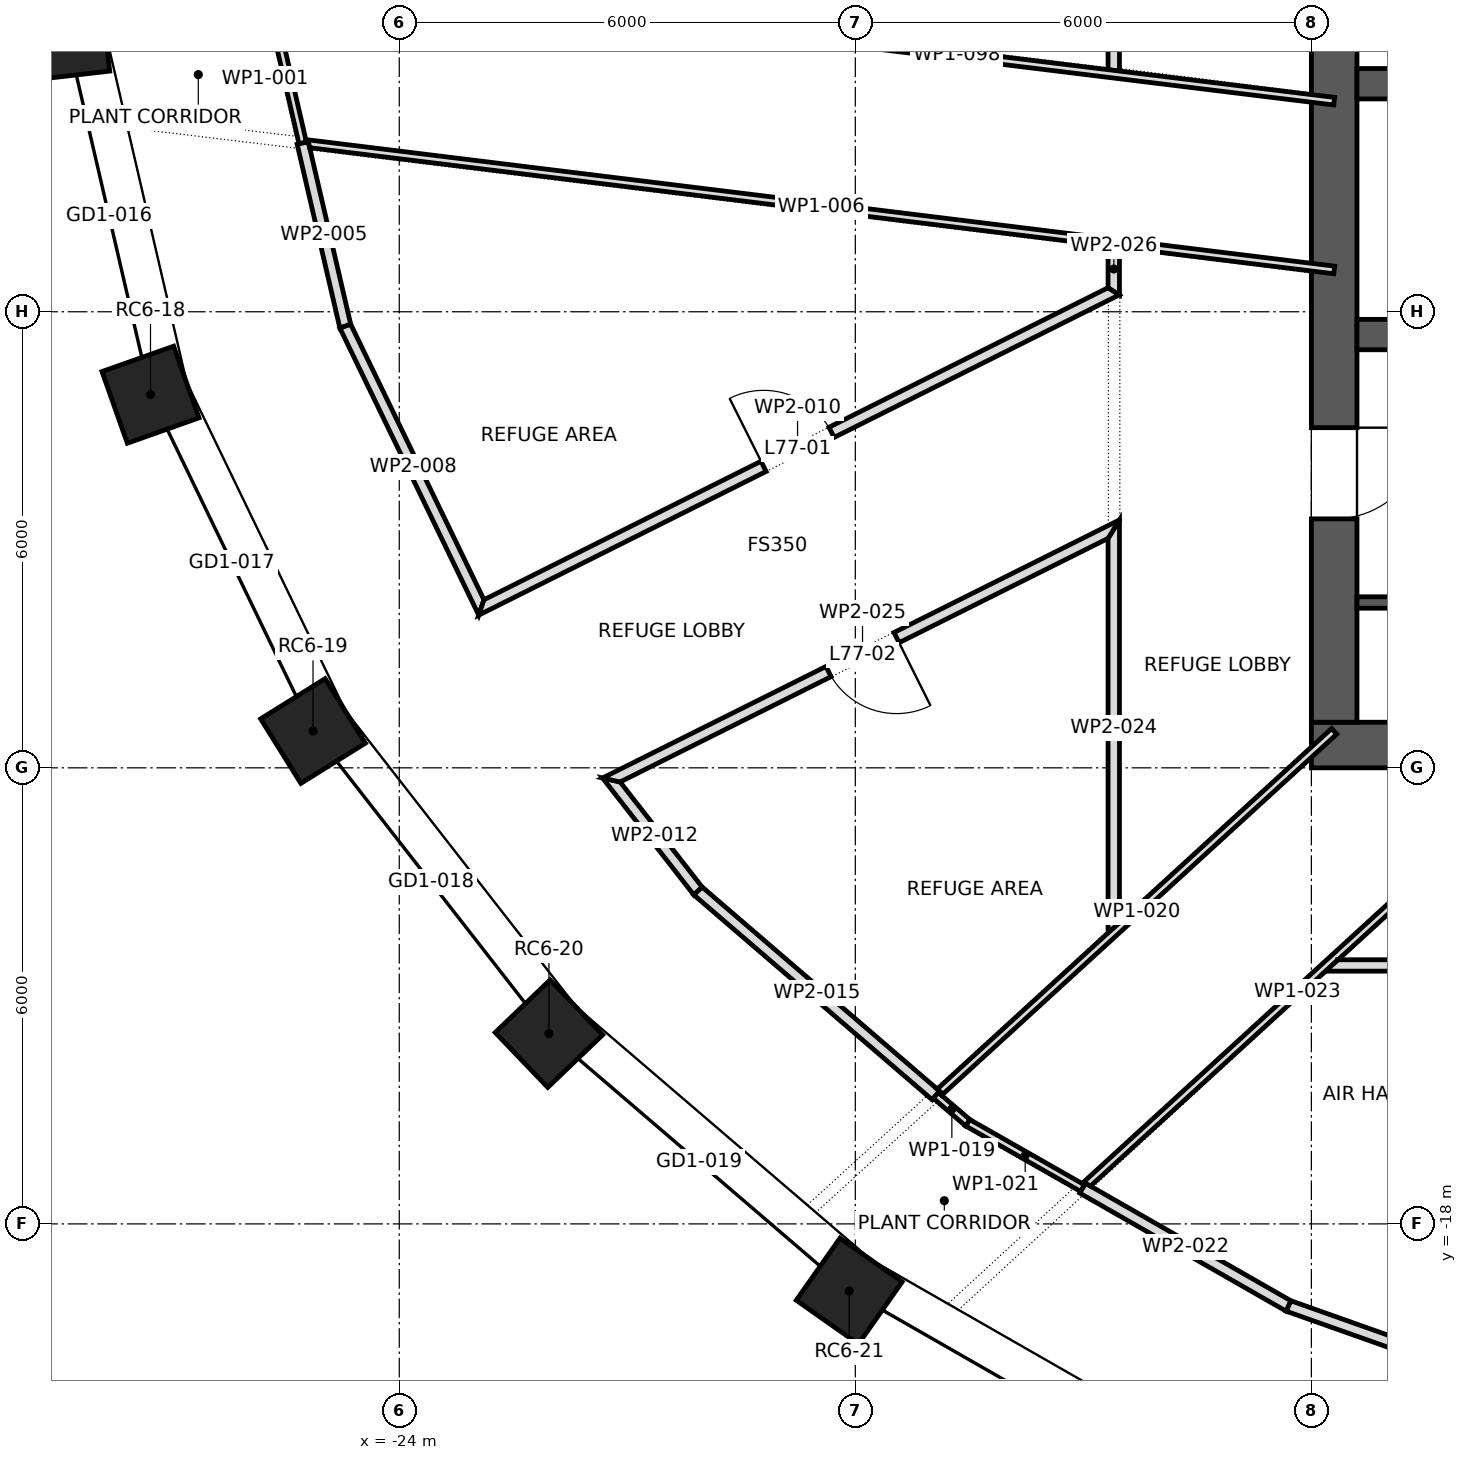
"""IFC4 building model, lengths in metres.
Left out: names, types, materials, properties, quantities, classifications, styles, units other than length and angle.
Written with IfcOpenShell. Run it as: python <this file> out.ifc"""

import sys

from ifc_helpers import new_model, si_unit, direction, frame, frame_2d, origin, origin_2d, place, context, subcontext, project, spatial, polyline, rectangle, outline, extrude, element, fill, save


model = new_model("IFC4")
c1 = context("Model", 3, precision=1e-05, world=origin(), true_north=direction((0.0, 1.0)))
c2 = subcontext(c1, "Body", "Model", "MODEL_VIEW")
j1 = project(units=[si_unit("LENGTHUNIT", "METRE"), si_unit("PLANEANGLEUNIT", "RADIAN")], contexts=[c1])
p1 = place(None, origin())
s1 = spatial("IfcSite", under=j1, at=p1, CompositionType="ELEMENT")
p2 = place(p1, origin())
s2 = spatial("IfcBuilding", under=s1, at=p2, CompositionType="ELEMENT")
p3 = place(p2, frame((0.0, 0.0, 328.3)))
s3 = spatial("IfcBuildingStorey", under=s2, at=p3, CompositionType="ELEMENT", Elevation=328.3)
for number, where, z_axis, x_axis in (
    (1, (-28.363, -2.394, 0.0), (0.0, 0.0, 1.0), (0.114, -0.993, 0.0)),
    (2, (-27.273, -7.091, 0.0), (0.0, 0.0, 1.0), (0.334, -0.943, 0.0)),
    (3, (-25.135, -11.516, 0.0), (0.0, 0.0, 1.0), (0.529, -0.849, 0.0)),
    (4, (-22.031, -15.497, 0.0), (0.0, 0.0, 1.0), (0.692, -0.722, 0.0)),
    (5, (-18.08, -18.884, 0.0), (0.0, 0.0, 1.0), (0.818, -0.575, 0.0)),
):
    element("IfcColumn", number, at=place(p3, frame(where, z_axis=z_axis, x_axis=x_axis)), inside=s3, PredefinedType="COLUMN", context=c2, shape_type="SweptSolid", body=[
        extrude(rectangle(XDim=1.0, YDim=1.0, at=origin_2d()), origin(), (0.0, 0.0, 1.0), 5.0),
    ])
p4 = place(p3, frame((-12.0, -11.7, 0.0), z_axis=(0.0, 0.0, 1.0), x_axis=(1.0, 0.0, 0.0)))
e6 = element("IfcWall", 6, at=p4, inside=s3, PredefinedType="SHEAR", context=c2, shape_type="SweptSolid", body=[
    extrude(rectangle(XDim=24.0, YDim=0.6, at=frame_2d((12.0, 0.0))), origin(), (0.0, 0.0, 1.0), 5.0),
])
p5 = place(p4, frame((10.025, 0.0, 0.0)))
e7 = element("IfcOpeningElement", 7, at=p5, cuts=e6, PredefinedType="OPENING", context=c2, shape_type="SweptSolid", body=[
    extrude(rectangle(XDim=0.8, YDim=2.1, at=frame_2d((0.4, 1.05))), frame((0.0, 0.312, 0.0), z_axis=(0.0, -1.0, 0.0), x_axis=(1.0, 0.0, 0.0)), (0.0, 0.0, 1.0), 0.624),
])
p6 = place(p4, frame((4.2, 0.0, 0.0)))
e8 = element("IfcOpeningElement", 8, at=p6, cuts=e6, PredefinedType="OPENING", context=c2, shape_type="SweptSolid", body=[
    extrude(rectangle(XDim=0.8, YDim=2.1, at=frame_2d((0.4, 1.05))), frame((0.0, 0.312, 0.0), z_axis=(0.0, -1.0, 0.0), x_axis=(1.0, 0.0, 0.0)), (0.0, 0.0, 1.0), 0.624),
])
p7 = place(p4, frame((15.85, 0.0, 0.0)))
e9 = element("IfcOpeningElement", 9, at=p7, cuts=e6, PredefinedType="OPENING", context=c2, shape_type="SweptSolid", body=[
    extrude(rectangle(XDim=0.8, YDim=2.1, at=frame_2d((0.4, 1.05))), frame((0.0, 0.312, 0.0), z_axis=(0.0, -1.0, 0.0), x_axis=(1.0, 0.0, 0.0)), (0.0, 0.0, 1.0), 0.624),
])
p8 = place(p3, frame((-11.7, -11.4, 0.0), z_axis=(0.0, 0.0, 1.0), x_axis=(0.0, 1.0, 0.0)))
e10 = element("IfcWall", 10, at=p8, inside=s3, PredefinedType="SHEAR", context=c2, shape_type="SweptSolid", body=[
    extrude(rectangle(XDim=22.8, YDim=0.6, at=frame_2d((11.4, 0.0))), origin(), (0.0, 0.0, 1.0), 5.0),
])
p9 = place(p8, frame((10.2, 0.0, 0.0)))
e11 = element("IfcOpeningElement", 11, at=p9, cuts=e10, PredefinedType="OPENING", context=c2, shape_type="SweptSolid", body=[
    extrude(rectangle(XDim=2.4, YDim=2.1, at=frame_2d((1.2, 1.05))), frame((0.0, 0.312, 0.0), z_axis=(0.0, -1.0, 0.0), x_axis=(1.0, 0.0, 0.0)), (0.0, 0.0, 1.0), 0.624),
])
p10 = place(p8, frame((18.925, 0.0, 0.0)))
e12 = element("IfcOpeningElement", 12, at=p10, cuts=e10, PredefinedType="OPENING", context=c2, shape_type="SweptSolid", body=[
    extrude(rectangle(XDim=1.2, YDim=2.1, at=frame_2d((0.6, 1.05))), frame((0.0, 0.312, 0.0), z_axis=(0.0, -1.0, 0.0), x_axis=(1.0, 0.0, 0.0)), (0.0, 0.0, 1.0), 0.624),
])
p11 = place(p8, frame((2.675, 0.0, 0.0)))
e13 = element("IfcOpeningElement", 13, at=p11, cuts=e10, PredefinedType="OPENING", context=c2, shape_type="SweptSolid", body=[
    extrude(rectangle(XDim=1.2, YDim=2.1, at=frame_2d((0.6, 1.05))), frame((0.0, 0.312, 0.0), z_axis=(0.0, -1.0, 0.0), x_axis=(1.0, 0.0, 0.0)), (0.0, 0.0, 1.0), 0.624),
])
p12 = place(p3, frame((-11.4, -3.0, 0.0), z_axis=(0.0, 0.0, 1.0), x_axis=(1.0, 0.0, 0.0)))
e14 = element("IfcWall", 14, at=p12, inside=s3, PredefinedType="SHEAR", context=c2, shape_type="SweptSolid", body=[
    extrude(rectangle(XDim=22.8, YDim=0.4, at=frame_2d((11.4, 0.0))), origin(), (0.0, 0.0, 1.0), 5.0),
])
p13 = place(p12, frame((18.35, 0.0, 0.0)))
e15 = element("IfcOpeningElement", 15, at=p13, cuts=e14, PredefinedType="OPENING", context=c2, shape_type="SweptSolid", body=[
    extrude(rectangle(XDim=1.1, YDim=2.1, at=frame_2d((0.55, 1.05))), frame((0.0, 0.212, 0.0), z_axis=(0.0, -1.0, 0.0), x_axis=(1.0, 0.0, 0.0)), (0.0, 0.0, 1.0), 0.424),
])
p14 = place(p12, frame((13.137, 0.0, 0.0)))
e16 = element("IfcOpeningElement", 16, at=p14, cuts=e14, PredefinedType="OPENING", context=c2, shape_type="SweptSolid", body=[
    extrude(rectangle(XDim=0.8, YDim=2.1, at=frame_2d((0.4, 1.05))), frame((0.0, 0.212, 0.0), z_axis=(0.0, -1.0, 0.0), x_axis=(1.0, 0.0, 0.0)), (0.0, 0.0, 1.0), 0.424),
])
p15 = place(p12, frame((15.512, 0.0, 0.0)))
e17 = element("IfcOpeningElement", 17, at=p15, cuts=e14, PredefinedType="OPENING", context=c2, shape_type="SweptSolid", body=[
    extrude(rectangle(XDim=0.9, YDim=2.1, at=frame_2d((0.45, 1.05))), frame((0.0, 0.212, 0.0), z_axis=(0.0, -1.0, 0.0), x_axis=(1.0, 0.0, 0.0)), (0.0, 0.0, 1.0), 0.424),
])
p16 = place(p12, frame((5.95, 0.0, 0.0)))
e18 = element("IfcOpeningElement", 18, at=p16, cuts=e14, PredefinedType="OPENING", context=c2, shape_type="SweptSolid", body=[
    extrude(rectangle(XDim=0.9, YDim=2.1, at=frame_2d((0.45, 1.05))), frame((0.0, 0.212, 0.0), z_axis=(0.0, -1.0, 0.0), x_axis=(1.0, 0.0, 0.0)), (0.0, 0.0, 1.0), 0.424),
])
p17 = place(p3, frame((-11.4, -6.3, 0.0), z_axis=(0.0, 0.0, 1.0), x_axis=(1.0, 0.0, 0.0)))
e19 = element("IfcWall", 19, at=p17, inside=s3, PredefinedType="SHEAR", context=c2, shape_type="SweptSolid", body=[
    extrude(rectangle(XDim=22.8, YDim=0.4, at=frame_2d((11.4, 0.0))), origin(), (0.0, 0.0, 1.0), 5.0),
])
p18 = place(p17, frame((20.85, 0.0, 0.0)))
e20 = element("IfcOpeningElement", 20, at=p18, cuts=e19, PredefinedType="OPENING", context=c2, shape_type="SweptSolid", body=[
    extrude(rectangle(XDim=1.1, YDim=2.1, at=frame_2d((0.55, 1.05))), frame((0.0, 0.212, 0.0), z_axis=(0.0, -1.0, 0.0), x_axis=(1.0, 0.0, 0.0)), (0.0, 0.0, 1.0), 0.424),
])
p19 = place(p3, frame((-11.4, -9.825, 0.0), z_axis=(0.0, 0.0, 1.0), x_axis=(1.0, 0.0, 0.0)))
e21 = element("IfcWall", 21, at=p19, inside=s3, PredefinedType="SHEAR", context=c2, shape_type="SweptSolid", body=[
    extrude(rectangle(XDim=8.0, YDim=0.15, at=frame_2d((4.0, 0.0))), origin(), (0.0, 0.0, 1.0), 4.65),
])
p20 = place(p3, frame((-25.661, -2.084, 0.0), z_axis=(0.0, 0.0, 1.0), x_axis=(0.224900492943, -0.974381736423, 0.0)))
e22 = element("IfcWall", 22, at=p20, inside=s3, PredefinedType="PARTITIONING", context=c2, shape_type="SweptSolid", body=[
    extrude(outline(polyline([(1.74, 0.05), (0.011, 0.05), (0.0, -0.05), (0.0, -0.05), (1.74, -0.05), (1.74, 0.05)])), origin(), (0.0, 0.0, 1.0), 4.65),
])
p21 = place(p3, frame((-25.27, -3.78, 0.0), z_axis=(0.0, 0.0, 1.0), x_axis=(0.226374638152, -0.974040308818, 0.0)))
e23 = element("IfcWall", 23, at=p21, inside=s3, PredefinedType="PARTITIONING", context=c2, shape_type="SweptSolid", body=[
    extrude(outline(polyline([(0.0, -0.075), (2.482, -0.075), (2.466, 0.075), (0.0, 0.075), (0.0, -0.075)])), origin(), (0.0, 0.0, 1.0), 4.65),
])
p22 = place(p3, frame((-25.235, -3.784, 0.0), z_axis=(0.0, 0.0, 1.0), x_axis=(0.992511578582, -0.122150588948, 0.0)))
e24 = element("IfcWall", 24, at=p22, inside=s3, PredefinedType="PARTITIONING", context=c2, shape_type="SweptSolid", body=[
    extrude(outline(polyline([(0.063, -0.05), (1.852, -0.05), (3.64, -0.05), (5.429, -0.05), (7.218, -0.05), (9.007, -0.05), (10.795, -0.05), (10.797, -0.05), (10.797, -0.05), (12.217, -0.05), (13.637, -0.05), (13.637, 0.05), (11.689, 0.05), (9.741, 0.05), (7.792, 0.05), (5.844, 0.05), (3.896, 0.05), (1.948, 0.05), (0.0, 0.05), (0.0, 0.049), (0.011, 0.017), (0.035, 0.026), (0.063, -0.05)])), origin(), (0.0, 0.0, 1.0), 4.65),
])
p23 = place(p3, frame((-24.714, -6.183, 0.0), z_axis=(0.0, 0.0, 1.0), x_axis=(0.435487900819, -0.900194583543, 0.0)))
e25 = element("IfcWall", 25, at=p23, inside=s3, PredefinedType="PARTITIONING", context=c2, shape_type="SweptSolid", body=[
    extrude(outline(polyline([(0.0, -0.075), (1.398, -0.075), (2.796, -0.075), (4.195, -0.075), (4.043, 0.075), (2.701, 0.075), (1.359, 0.075), (0.017, 0.075), (0.0, -0.074), (0.0, -0.075)])), origin(), (0.0, 0.0, 1.0), 4.65),
])
p24 = place(p3, frame((-22.988, -9.924, 0.0), z_axis=(0.0, 0.0, 1.0), x_axis=(0.894422009939, 0.447223957471, 0.0)))
e26 = element("IfcWall", 26, at=p24, inside=s3, PredefinedType="PARTITIONING", context=c2, shape_type="SweptSolid", body=[
    extrude(outline(polyline([(0.0, -0.075), (1.885, -0.075), (3.77, -0.075), (5.655, -0.075), (7.54, -0.075), (9.424, -0.075), (9.332, 0.075), (7.496, 0.075), (5.66, 0.075), (3.824, 0.075), (1.988, 0.075), (0.152, 0.075), (0.0, -0.075)])), origin(), (0.0, 0.0, 1.0), 4.65),
])
p25 = place(p24, frame((4.227, 0.0, 0.0)))
e27 = element("IfcOpeningElement", 27, at=p25, cuts=e26, PredefinedType="OPENING", context=c2, shape_type="SweptSolid", body=[
    extrude(rectangle(XDim=1.0, YDim=2.1, at=frame_2d((0.5, 1.05))), frame((0.0, 0.087, 0.0), z_axis=(0.0, -1.0, 0.0), x_axis=(1.0, 0.0, 0.0)), (0.0, 0.0, 1.0), 0.174),
])
p26 = place(p3, frame((-21.266, -12.088, 0.0), z_axis=(0.0, 0.0, 1.0), x_axis=(0.615359969765, -0.788246222706, 0.0)))
e28 = element("IfcWall", 28, at=p26, inside=s3, PredefinedType="PARTITIONING", context=c2, shape_type="SweptSolid", body=[
    extrude(outline(polyline([(0.0, -0.075), (1.951, -0.075), (1.937, 0.075), (0.184, 0.075), (0.0, -0.075)])), origin(), (0.0, 0.0, 1.0), 4.65),
])
p27 = place(p3, frame((-20.076, -13.615, 0.0), z_axis=(0.0, 0.0, 1.0), x_axis=(0.75838482234, -0.651807073638, 0.0)))
e29 = element("IfcWall", 29, at=p27, inside=s3, PredefinedType="PARTITIONING", context=c2, shape_type="SweptSolid", body=[
    extrude(outline(polyline([(4.135, 0.075), (2.761, 0.075), (1.388, 0.075), (0.015, 0.075), (0.0, -0.075), (1.378, -0.075), (2.757, -0.075), (4.135, -0.075), (4.135, 0.075)])), origin(), (0.0, 0.0, 1.0), 4.65),
])
p28 = place(p3, frame((-16.94, -16.31, 0.0), z_axis=(0.0, 0.0, 1.0), x_axis=(0.759287493017, -0.650755332632, 0.0)))
e30 = element("IfcWall", 30, at=p28, inside=s3, PredefinedType="PARTITIONING", context=c2, shape_type="SweptSolid", body=[
    extrude(outline(polyline([(0.558, -0.05), (0.558, -0.05), (0.548, 0.05), (0.0, 0.05), (0.0, -0.05), (0.558, -0.05)])), origin(), (0.0, 0.0, 1.0), 4.65),
])
p29 = place(p3, frame((-16.898, -16.272, 0.0), z_axis=(0.0, 0.0, 1.0), x_axis=(0.738080105563, 0.674713092931, 0.0)))
e31 = element("IfcWall", 31, at=p29, inside=s3, PredefinedType="PARTITIONING", context=c2, shape_type="SweptSolid", body=[
    extrude(outline(polyline([(7.043, 0.05), (5.152, 0.05), (3.261, 0.05), (3.259, 0.048), (3.257, 0.05), (1.635, 0.05), (0.013, 0.05), (0.018, 0.009), (0.0, 0.007), (0.0, -0.05), (1.761, -0.05), (3.521, -0.05), (5.282, -0.05), (7.043, -0.05), (7.043, 0.05)])), origin(), (0.0, 0.0, 1.0), 4.65),
])
p30 = place(p3, frame((-16.524, -16.667, 0.0), z_axis=(0.0, 0.0, 1.0), x_axis=(0.868906227939, -0.494976733845, 0.0)))
e32 = element("IfcWall", 32, at=p30, inside=s3, PredefinedType="PARTITIONING", context=c2, shape_type="SweptSolid", body=[
    extrude(outline(polyline([(1.743, 0.05), (0.01, 0.05), (0.0, -0.05), (1.743, -0.05), (1.743, 0.05)])), origin(), (0.0, 0.0, 1.0), 4.65),
])
p31 = place(p3, frame((-15.01, -17.53, 0.0), z_axis=(0.0, 0.0, 1.0), x_axis=(0.868060601706, -0.496458247757, 0.0)))
e33 = element("IfcWall", 33, at=p31, inside=s3, PredefinedType="PARTITIONING", context=c2, shape_type="SweptSolid", body=[
    extrude(outline(polyline([(3.129, -0.075), (3.129, -0.075), (3.115, 0.075), (1.558, 0.075), (0.0, 0.075), (0.0, -0.075), (1.564, -0.075), (3.129, -0.075)])), origin(), (0.0, 0.0, 1.0), 4.65),
])
p32 = place(p3, frame((-14.983, -17.505, 0.0), z_axis=(0.0, 0.0, 1.0), x_axis=(0.738034752837, 0.6747627017, 0.0)))
e34 = element("IfcWall", 34, at=p32, inside=s3, PredefinedType="PARTITIONING", context=c2, shape_type="SweptSolid", body=[
    extrude(outline(polyline([(0.058, -0.05), (1.528, -0.05), (2.998, -0.05), (4.467, -0.05), (4.469, -0.048), (4.472, -0.05), (6.036, -0.05), (7.601, -0.05), (7.601, -0.05), (7.551, 0.0), (7.501, 0.05), (7.501, 0.05), (5.626, 0.05), (3.751, 0.05), (1.875, 0.05), (0.0, 0.05), (0.0, 0.05), (0.011, 0.015), (0.0, 0.012), (0.0, 0.012), (0.035, 0.023), (0.058, -0.05)])), origin(), (0.0, 0.0, 1.0), 4.65),
])
p33 = place(p3, frame((-14.6, -14.171, 0.0), z_axis=(0.0, 0.0, 1.0), x_axis=(0.0, 1.0, 0.0)))
e35 = element("IfcWall", 35, at=p33, inside=s3, PredefinedType="PARTITIONING", context=c2, shape_type="SweptSolid", body=[
    extrude(outline(polyline([(0.137, -0.075), (1.902, -0.075), (3.667, -0.075), (5.432, -0.075), (5.311, 0.0), (5.19, 0.075), (5.19, 0.075), (5.19, 0.075), (3.46, 0.075), (1.73, 0.075), (0.0, 0.075), (0.0, 0.074), (0.137, -0.075)])), origin(), (0.0, 0.0, 1.0), 4.65),
])
p34 = place(p3, frame((-14.491, -8.806, 0.0), z_axis=(0.0, 0.0, 1.0), x_axis=(-0.89470325258, -0.446661045786, 0.0)))
e36 = element("IfcWall", 36, at=p34, inside=s3, PredefinedType="PARTITIONING", context=c2, shape_type="SweptSolid", body=[
    extrude(outline(polyline([(7.601, -0.075), (7.601, -0.075), (7.417, 0.075), (5.624, 0.075), (3.83, 0.075), (2.036, 0.075), (0.243, 0.075), (0.0, -0.075), (1.9, -0.075), (3.801, -0.075), (5.701, -0.075), (7.601, -0.075)])), origin(), (0.0, 0.0, 1.0), 4.65),
])
p35 = place(p34, frame((3.315, 0.0, 0.0)))
e37 = element("IfcOpeningElement", 37, at=p35, cuts=e36, PredefinedType="OPENING", context=c2, shape_type="SweptSolid", body=[
    extrude(rectangle(XDim=1.0, YDim=2.1, at=frame_2d((0.5, 1.05))), frame((0.0, 0.087, 0.0), z_axis=(0.0, -1.0, 0.0), x_axis=(1.0, 0.0, 0.0)), (0.0, 0.0, 1.0), 0.174),
])
p36 = place(p3, frame((-14.6, -5.776, 0.0), z_axis=(0.0, 0.0, 1.0), x_axis=(0.0, 1.0, 0.0)))
e38 = element("IfcWall", 38, at=p36, inside=s3, PredefinedType="PARTITIONING", context=c2, shape_type="SweptSolid", body=[
    extrude(outline(polyline([(0.0, -0.075), (0.624, -0.075), (0.642, 0.073), (0.642, 0.075), (0.093, 0.075), (0.093, 0.075), (0.093, 0.075), (0.046, 0.0), (0.0, -0.075)])), origin(), (0.0, 0.0, 1.0), 4.65),
])
p37 = place(p3, frame((-14.6, -2.833, 0.0), z_axis=(0.0, 0.0, 1.0), x_axis=(0.0, 1.0, 0.0)))
e39 = element("IfcWall", 39, at=p37, inside=s3, PredefinedType="PARTITIONING", context=c2, shape_type="SweptSolid", body=[
    extrude(outline(polyline([(0.0, -0.075), (1.664, -0.075), (3.328, -0.075), (4.992, -0.075), (4.934, 0.0), (4.875, 0.075), (4.875, 0.075), (4.875, 0.075), (3.256, 0.075), (1.637, 0.075), (0.018, 0.075), (0.0, -0.074), (0.0, -0.075)])), origin(), (0.0, 0.0, 1.0), 4.65),
])
p38 = place(p3, frame((-12.306, -19.078, 0.0), z_axis=(0.0, 0.0, 1.0), x_axis=(0.9426149562, -0.333881781995, 0.0)))
e40 = element("IfcWall", 40, at=p38, inside=s3, PredefinedType="PARTITIONING", context=c2, shape_type="SweptSolid", body=[
    extrude(outline(polyline([(0.0, -0.075), (1.435, -0.075), (2.87, -0.075), (4.305, -0.075), (4.153, 0.075), (2.773, 0.075), (1.393, 0.075), (0.013, 0.075), (0.0, -0.075), (0.0, -0.075)])), origin(), (0.0, 0.0, 1.0), 4.65),
])
p39 = place(p3, frame((-6.246, -14.6, 0.0), z_axis=(0.0, 0.0, 1.0), x_axis=(-1.0, 0.0, 0.0)))
e41 = element("IfcWall", 41, at=p39, inside=s3, PredefinedType="PARTITIONING", context=c2, shape_type="SweptSolid", body=[
    extrude(outline(polyline([(0.0, -0.075), (1.801, -0.075), (3.602, -0.075), (5.404, -0.075), (5.567, 0.075), (3.781, 0.075), (1.995, 0.075), (0.208, 0.075), (0.208, 0.075), (0.208, 0.075), (0.104, 0.0), (0.0, -0.075)])), origin(), (0.0, 0.0, 1.0), 4.65),
])
p40 = place(p3, frame((-21.629, -2.014, 0.0), z_axis=(0.0, 0.0, 1.0), x_axis=(0.992580859713, -0.121586335302, 0.0)))
e42 = element("IfcWall", 42, at=p40, inside=s3, PredefinedType="PARTITIONING", context=c2, shape_type="SweptSolid", body=[
    extrude(outline(polyline([(0.0, 0.05), (0.0, -0.05), (1.667, -0.05), (3.334, -0.05), (5.002, -0.05), (6.669, -0.05), (8.336, -0.05), (10.004, -0.05), (10.004, 0.05), (8.336, 0.05), (6.669, 0.05), (5.002, 0.05), (3.334, 0.05), (1.667, 0.05), (0.0, 0.05)])), origin(), (0.0, 0.0, 1.0), 4.65),
])
p41 = place(p11, frame((1.2, 0.0, 0.0), z_axis=(0.0, 0.0, 1.0), x_axis=(-1.0, 0.0, 0.0)))
e43 = element("IfcDoor", 43, at=p41, inside=s3, OperationType="SINGLE_SWING_RIGHT", PredefinedType="DOOR", context=c2, shape_type="SweptSolid", body=[
    extrude(rectangle(XDim=1.2, YDim=2.1, at=frame_2d((0.6, 1.05))), frame((0.0, 0.025, 0.0), z_axis=(0.0, -1.0, 0.0), x_axis=(1.0, 0.0, 0.0)), (0.0, 0.0, 1.0), 0.05),
])
fill(e13, e43)
p42 = place(p25, origin())
e44 = element("IfcDoor", 44, at=p42, inside=s3, OperationType="SINGLE_SWING_RIGHT", PredefinedType="DOOR", context=c2, shape_type="SweptSolid", body=[
    extrude(rectangle(XDim=1.0, YDim=2.1, at=frame_2d((0.5, 1.05))), frame((0.0, 0.025, 0.0), z_axis=(0.0, -1.0, 0.0), x_axis=(1.0, 0.0, 0.0)), (0.0, 0.0, 1.0), 0.05),
])
fill(e27, e44)
p43 = place(p35, origin())
e45 = element("IfcDoor", 45, at=p43, inside=s3, OperationType="SINGLE_SWING_RIGHT", PredefinedType="DOOR", context=c2, shape_type="SweptSolid", body=[
    extrude(rectangle(XDim=1.0, YDim=2.1, at=frame_2d((0.5, 1.05))), frame((0.0, 0.025, 0.0), z_axis=(0.0, -1.0, 0.0), x_axis=(1.0, 0.0, 0.0)), (0.0, 0.0, 1.0), 0.05),
])
fill(e37, e45)
save(model, sys.argv[1])
